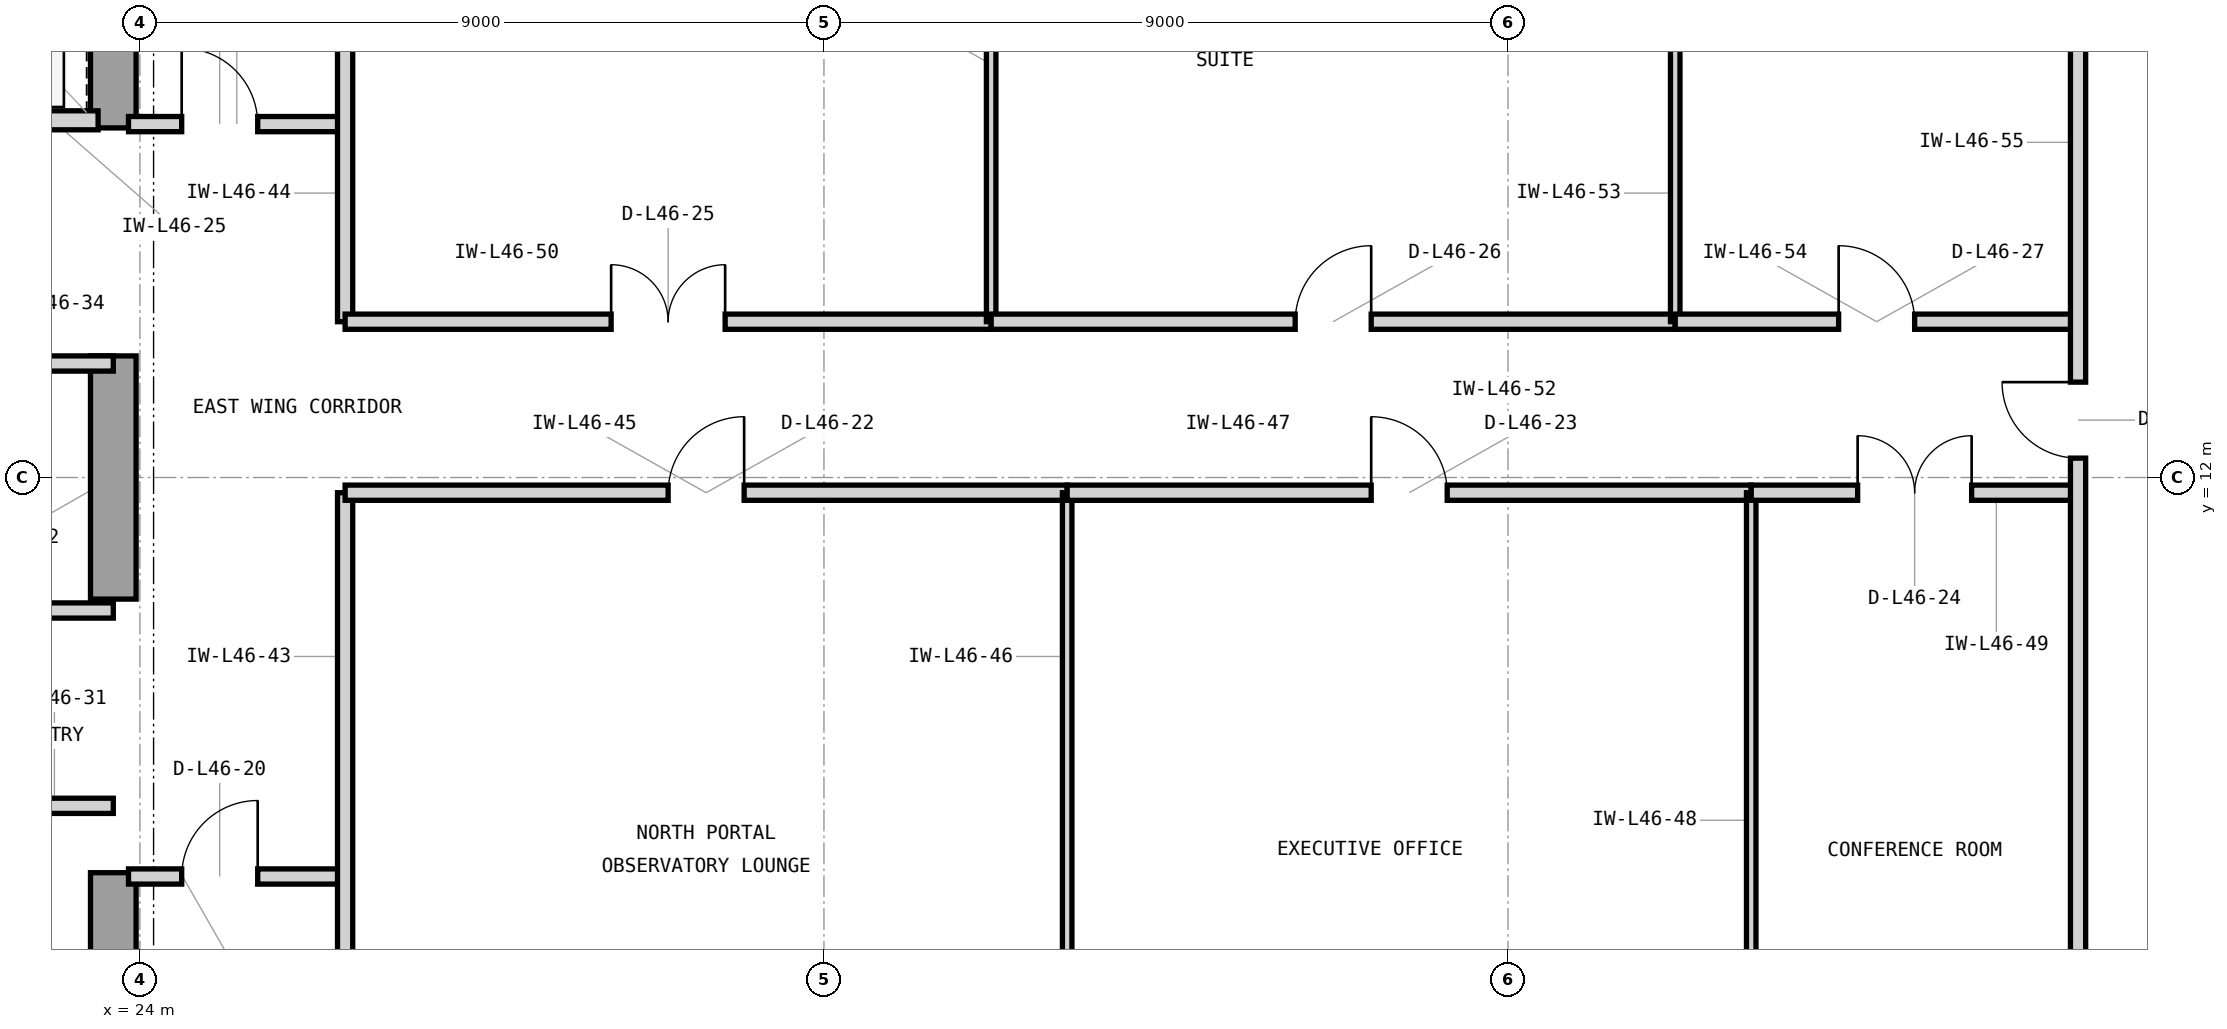
"""IFC4 building model, lengths in metres.
Left out: names, types, materials, properties, quantities, classifications, styles, units other than length and angle.
Written with IfcOpenShell. Run it as: python <this file> out.ifc"""

import sys

from ifc_helpers import new_model, si_unit, direction, frame, frame_2d, origin, place, context, subcontext, project, spatial, rectangle, extrude, element, fill, save


model = new_model("IFC4")
c1 = context("Model", 3, precision=1e-05, world=origin(), true_north=direction((0.0, 1.0)))
c2 = subcontext(c1, "Body", "Model", "MODEL_VIEW")
j1 = project(units=[si_unit("LENGTHUNIT", "METRE"), si_unit("PLANEANGLEUNIT", "RADIAN")], contexts=[c1])
p1 = place(None, origin())
s1 = spatial("IfcSite", under=j1, at=p1, CompositionType="ELEMENT")
p2 = place(p1, origin())
s2 = spatial("IfcBuilding", under=s1, at=p2, CompositionType="ELEMENT")
p3 = place(p2, frame((0.0, 0.0, 191.7)))
s3 = spatial("IfcBuildingStorey", under=s2, at=p3, CompositionType="ELEMENT", Elevation=191.7)
p4 = place(p3, frame((23.65, 3.65, 0.0), z_axis=(0.0, 0.0, 1.0), x_axis=(0.0, 1.0, 0.0)))
e1 = element("IfcWall", 1, at=p4, inside=s3, PredefinedType="SHEAR", context=c2, shape_type="SweptSolid", body=[
    extrude(rectangle(XDim=3.15, YDim=0.6, at=frame_2d((1.575, 0.0))), origin(), (0.0, 0.0, 1.0), 3.9),
])
p5 = place(p3, frame((23.65, 10.4, 0.0), z_axis=(0.0, 0.0, 1.0), x_axis=(0.0, 1.0, 0.0)))
e2 = element("IfcWall", 2, at=p5, inside=s3, PredefinedType="SHEAR", context=c2, shape_type="SweptSolid", body=[
    extrude(rectangle(XDim=3.2, YDim=0.6, at=frame_2d((1.6, 0.0))), origin(), (0.0, 0.0, 1.0), 3.9),
])
p6 = place(p3, frame((23.65, 16.6, 0.0), z_axis=(0.0, 0.0, 1.0), x_axis=(0.0, 1.0, 0.0)))
e3 = element("IfcWall", 3, at=p6, inside=s3, PredefinedType="SHEAR", context=c2, shape_type="SweptSolid", body=[
    extrude(rectangle(XDim=4.05, YDim=0.6, at=frame_2d((2.025, 0.0))), origin(), (0.0, 0.0, 1.0), 3.9),
])
p7 = place(p3, frame((21.05, 16.7, 0.0), z_axis=(0.0, 0.0, 1.0), x_axis=(1.0, 0.0, 0.0)))
e4 = element("IfcWall", 4, at=p7, inside=s3, PredefinedType="PARTITIONING", context=c2, shape_type="SweptSolid", body=[
    extrude(rectangle(XDim=2.4, YDim=0.25, at=frame_2d((1.2, 0.0))), origin(), (0.0, 0.0, 1.0), 3.283),
])
p8 = place(p7, frame((0.52, 0.0, 0.0)))
e5 = element("IfcOpeningElement", 5, at=p8, cuts=e4, PredefinedType="OPENING", context=c2, shape_type="SweptSolid", body=[
    extrude(rectangle(XDim=1.15, YDim=2.25, at=frame_2d((0.575, 1.125))), frame((0.0, 0.135, 0.0), z_axis=(0.0, -1.0, 0.0), x_axis=(1.0, 0.0, 0.0)), (0.0, 0.0, 1.0), 0.27),
])
p9 = place(p3, frame((20.55, 7.68, 0.0), z_axis=(0.0, 0.0, 1.0), x_axis=(1.0, 0.0, 0.0)))
e6 = element("IfcWall", 6, at=p9, inside=s3, PredefinedType="PARTITIONING", context=c2, shape_type="SweptSolid", body=[
    extrude(rectangle(XDim=3.1, YDim=0.2, at=frame_2d((1.55, 0.0))), origin(), (0.0, 0.0, 1.0), 3.69),
])
p10 = place(p9, frame((1.075, 0.0, 0.0)))
e7 = element("IfcOpeningElement", 7, at=p10, cuts=e6, PredefinedType="OPENING", context=c2, shape_type="SweptSolid", body=[
    extrude(rectangle(XDim=0.95, YDim=2.1, at=frame_2d((0.475, 1.05))), frame((0.0, 0.11, 0.0), z_axis=(0.0, -1.0, 0.0), x_axis=(1.0, 0.0, 0.0)), (0.0, 0.0, 1.0), 0.22),
])
p11 = place(p3, frame((14.825, 10.25, 0.0), z_axis=(0.0, 0.0, 1.0), x_axis=(1.0, 0.0, 0.0)))
e8 = element("IfcWall", 8, at=p11, inside=s3, PredefinedType="PARTITIONING", context=c2, shape_type="SweptSolid", body=[
    extrude(rectangle(XDim=8.825, YDim=0.2, at=frame_2d((4.413, 0.0))), origin(), (0.0, 0.0, 1.0), 3.69),
])
p12 = place(p3, frame((18.45, 13.5, 0.0), z_axis=(0.0, 0.0, 1.0), x_axis=(1.0, 0.0, 0.0)))
e9 = element("IfcWall", 9, at=p12, inside=s3, PredefinedType="PARTITIONING", context=c2, shape_type="SweptSolid", body=[
    extrude(rectangle(XDim=5.2, YDim=0.2, at=frame_2d((2.6, 0.0))), origin(), (0.0, 0.0, 1.0), 3.283),
])
p13 = place(p12, frame((2.125, 0.0, 0.0)))
e10 = element("IfcOpeningElement", 10, at=p13, cuts=e9, PredefinedType="OPENING", context=c2, shape_type="SweptSolid", body=[
    extrude(rectangle(XDim=0.95, YDim=2.1, at=frame_2d((0.475, 1.05))), frame((0.0, 0.11, 0.0), z_axis=(0.0, -1.0, 0.0), x_axis=(1.0, 0.0, 0.0)), (0.0, 0.0, 1.0), 0.22),
])
p14 = place(p3, frame((23.85, 6.75, 0.0), z_axis=(0.0, 0.0, 1.0), x_axis=(1.0, 0.0, 0.0)))
e11 = element("IfcWall", 11, at=p14, inside=s3, PredefinedType="PARTITIONING", context=c2, shape_type="SweptSolid", body=[
    extrude(rectangle(XDim=2.85, YDim=0.2, at=frame_2d((1.425, 0.0))), origin(), (0.0, 0.0, 1.0), 3.69),
])
p15 = place(p14, frame((0.7, 0.0, 0.0)))
e12 = element("IfcOpeningElement", 12, at=p15, cuts=e11, PredefinedType="OPENING", context=c2, shape_type="SweptSolid", body=[
    extrude(rectangle(XDim=1.0, YDim=2.15, at=frame_2d((0.5, 1.075))), frame((0.0, 0.11, 0.0), z_axis=(0.0, -1.0, 0.0), x_axis=(1.0, 0.0, 0.0)), (0.0, 0.0, 1.0), 0.22),
])
p16 = place(p3, frame((23.85, 16.65, 0.0), z_axis=(0.0, 0.0, 1.0), x_axis=(1.0, 0.0, 0.0)))
e13 = element("IfcWall", 13, at=p16, inside=s3, PredefinedType="PARTITIONING", context=c2, shape_type="SweptSolid", body=[
    extrude(rectangle(XDim=2.85, YDim=0.2, at=frame_2d((1.425, 0.0))), origin(), (0.0, 0.0, 1.0), 3.69),
])
p17 = place(p16, frame((0.7, 0.0, 0.0)))
e14 = element("IfcOpeningElement", 14, at=p17, cuts=e13, PredefinedType="OPENING", context=c2, shape_type="SweptSolid", body=[
    extrude(rectangle(XDim=1.0, YDim=2.15, at=frame_2d((0.5, 1.075))), frame((0.0, 0.11, 0.0), z_axis=(0.0, -1.0, 0.0), x_axis=(1.0, 0.0, 0.0)), (0.0, 0.0, 1.0), 0.22),
])
p18 = place(p3, frame((26.7, 3.18, 0.0), z_axis=(0.0, 0.0, 1.0), x_axis=(0.0, 1.0, 0.0)))
e15 = element("IfcWall", 15, at=p18, inside=s3, PredefinedType="PARTITIONING", context=c2, shape_type="SweptSolid", body=[
    extrude(rectangle(XDim=8.62, YDim=0.2, at=frame_2d((4.31, 0.0))), origin(), (0.0, 0.0, 1.0), 3.69),
])
p19 = place(p3, frame((26.7, 14.05, 0.0), z_axis=(0.0, 0.0, 1.0), x_axis=(0.0, 1.0, 0.0)))
e16 = element("IfcWall", 16, at=p19, inside=s3, PredefinedType="PARTITIONING", context=c2, shape_type="SweptSolid", body=[
    extrude(rectangle(XDim=6.77, YDim=0.2, at=frame_2d((3.385, 0.0))), origin(), (0.0, 0.0, 1.0), 3.69),
])
p20 = place(p3, frame((26.7, 11.8, 0.0), z_axis=(0.0, 0.0, 1.0), x_axis=(1.0, 0.0, 0.0)))
e17 = element("IfcWall", 17, at=p20, inside=s3, PredefinedType="PARTITIONING", context=c2, shape_type="SweptSolid", body=[
    extrude(rectangle(XDim=9.5, YDim=0.2, at=frame_2d((4.75, 0.0))), origin(), (0.0, 0.0, 1.0), 3.69),
])
p21 = place(p20, frame((4.25, 0.0, 0.0)))
e18 = element("IfcOpeningElement", 18, at=p21, cuts=e17, PredefinedType="OPENING", context=c2, shape_type="SweptSolid", body=[
    extrude(rectangle(XDim=1.0, YDim=2.15, at=frame_2d((0.5, 1.075))), frame((0.0, 0.11, 0.0), z_axis=(0.0, -1.0, 0.0), x_axis=(1.0, 0.0, 0.0)), (0.0, 0.0, 1.0), 0.22),
])
p22 = place(p3, frame((36.2, 3.18, 0.0), z_axis=(0.0, 0.0, 1.0), x_axis=(0.0, 1.0, 0.0)))
e19 = element("IfcWall", 19, at=p22, inside=s3, PredefinedType="PARTITIONING", context=c2, shape_type="SweptSolid", body=[
    extrude(rectangle(XDim=8.62, YDim=0.125, at=frame_2d((4.31, 0.0))), origin(), (0.0, 0.0, 1.0), 3.69),
])
p23 = place(p3, frame((36.2, 11.8, 0.0), z_axis=(0.0, 0.0, 1.0), x_axis=(1.0, 0.0, 0.0)))
e20 = element("IfcWall", 20, at=p23, inside=s3, PredefinedType="PARTITIONING", context=c2, shape_type="SweptSolid", body=[
    extrude(rectangle(XDim=9.0, YDim=0.2, at=frame_2d((4.5, 0.0))), origin(), (0.0, 0.0, 1.0), 3.69),
])
p24 = place(p23, frame((4.0, 0.0, 0.0)))
e21 = element("IfcOpeningElement", 21, at=p24, cuts=e20, PredefinedType="OPENING", context=c2, shape_type="SweptSolid", body=[
    extrude(rectangle(XDim=1.0, YDim=2.15, at=frame_2d((0.5, 1.075))), frame((0.0, 0.11, 0.0), z_axis=(0.0, -1.0, 0.0), x_axis=(1.0, 0.0, 0.0)), (0.0, 0.0, 1.0), 0.22),
])
p25 = place(p3, frame((45.2, 3.18, 0.0), z_axis=(0.0, 0.0, 1.0), x_axis=(0.0, 1.0, 0.0)))
e22 = element("IfcWall", 22, at=p25, inside=s3, PredefinedType="PARTITIONING", context=c2, shape_type="SweptSolid", body=[
    extrude(rectangle(XDim=8.62, YDim=0.125, at=frame_2d((4.31, 0.0))), origin(), (0.0, 0.0, 1.0), 3.69),
])
p26 = place(p3, frame((45.2, 11.8, 0.0), z_axis=(0.0, 0.0, 1.0), x_axis=(1.0, 0.0, 0.0)))
e23 = element("IfcWall", 23, at=p26, inside=s3, PredefinedType="PARTITIONING", context=c2, shape_type="SweptSolid", body=[
    extrude(rectangle(XDim=4.3, YDim=0.2, at=frame_2d((2.15, 0.0))), origin(), (0.0, 0.0, 1.0), 3.69),
])
p27 = place(p26, frame((1.4, 0.0, 0.0)))
e24 = element("IfcOpeningElement", 24, at=p27, cuts=e23, PredefinedType="OPENING", context=c2, shape_type="SweptSolid", body=[
    extrude(rectangle(XDim=1.5, YDim=2.3, at=frame_2d((0.75, 1.15))), frame((0.0, 0.11, 0.0), z_axis=(0.0, -1.0, 0.0), x_axis=(1.0, 0.0, 0.0)), (0.0, 0.0, 1.0), 0.22),
])
p28 = place(p3, frame((26.7, 14.05, 0.0), z_axis=(0.0, 0.0, 1.0), x_axis=(1.0, 0.0, 0.0)))
e25 = element("IfcWall", 25, at=p28, inside=s3, PredefinedType="PARTITIONING", context=c2, shape_type="SweptSolid", body=[
    extrude(rectangle(XDim=8.5, YDim=0.2, at=frame_2d((4.25, 0.0))), origin(), (0.0, 0.0, 1.0), 3.69),
])
p29 = place(p28, frame((3.5, 0.0, 0.0)))
e26 = element("IfcOpeningElement", 26, at=p29, cuts=e25, PredefinedType="OPENING", context=c2, shape_type="SweptSolid", body=[
    extrude(rectangle(XDim=1.5, YDim=2.3, at=frame_2d((0.75, 1.15))), frame((0.0, 0.11, 0.0), z_axis=(0.0, -1.0, 0.0), x_axis=(1.0, 0.0, 0.0)), (0.0, 0.0, 1.0), 0.22),
])
p30 = place(p3, frame((35.2, 14.05, 0.0), z_axis=(0.0, 0.0, 1.0), x_axis=(0.0, 1.0, 0.0)))
e27 = element("IfcWall", 27, at=p30, inside=s3, PredefinedType="PARTITIONING", context=c2, shape_type="SweptSolid", body=[
    extrude(rectangle(XDim=6.77, YDim=0.125, at=frame_2d((3.385, 0.0))), origin(), (0.0, 0.0, 1.0), 3.69),
])
p31 = place(p3, frame((35.2, 14.05, 0.0), z_axis=(0.0, 0.0, 1.0), x_axis=(1.0, 0.0, 0.0)))
e28 = element("IfcWall", 28, at=p31, inside=s3, PredefinedType="PARTITIONING", context=c2, shape_type="SweptSolid", body=[
    extrude(rectangle(XDim=9.0, YDim=0.2, at=frame_2d((4.5, 0.0))), origin(), (0.0, 0.0, 1.0), 3.69),
])
p32 = place(p31, frame((4.0, 0.0, 0.0)))
e29 = element("IfcOpeningElement", 29, at=p32, cuts=e28, PredefinedType="OPENING", context=c2, shape_type="SweptSolid", body=[
    extrude(rectangle(XDim=1.0, YDim=2.15, at=frame_2d((0.5, 1.075))), frame((0.0, 0.11, 0.0), z_axis=(0.0, -1.0, 0.0), x_axis=(1.0, 0.0, 0.0)), (0.0, 0.0, 1.0), 0.22),
])
p33 = place(p3, frame((44.2, 14.05, 0.0), z_axis=(0.0, 0.0, 1.0), x_axis=(0.0, 1.0, 0.0)))
e30 = element("IfcWall", 30, at=p33, inside=s3, PredefinedType="PARTITIONING", context=c2, shape_type="SweptSolid", body=[
    extrude(rectangle(XDim=6.77, YDim=0.125, at=frame_2d((3.385, 0.0))), origin(), (0.0, 0.0, 1.0), 3.69),
])
p34 = place(p3, frame((44.2, 14.05, 0.0), z_axis=(0.0, 0.0, 1.0), x_axis=(1.0, 0.0, 0.0)))
e31 = element("IfcWall", 31, at=p34, inside=s3, PredefinedType="PARTITIONING", context=c2, shape_type="SweptSolid", body=[
    extrude(rectangle(XDim=5.3, YDim=0.2, at=frame_2d((2.65, 0.0))), origin(), (0.0, 0.0, 1.0), 3.69),
])
p35 = place(p34, frame((2.15, 0.0, 0.0)))
e32 = element("IfcOpeningElement", 32, at=p35, cuts=e31, PredefinedType="OPENING", context=c2, shape_type="SweptSolid", body=[
    extrude(rectangle(XDim=1.0, YDim=2.15, at=frame_2d((0.5, 1.075))), frame((0.0, 0.11, 0.0), z_axis=(0.0, -1.0, 0.0), x_axis=(1.0, 0.0, 0.0)), (0.0, 0.0, 1.0), 0.22),
])
p36 = place(p3, frame((49.5, 3.18, 0.0), z_axis=(0.0, 0.0, 1.0), x_axis=(0.0, 1.0, 0.0)))
e33 = element("IfcWall", 33, at=p36, inside=s3, PredefinedType="PARTITIONING", context=c2, shape_type="SweptSolid", body=[
    extrude(rectangle(XDim=17.64, YDim=0.2, at=frame_2d((8.82, 0.0))), origin(), (0.0, 0.0, 1.0), 3.69),
])
p37 = place(p36, frame((9.075, 0.0, 0.0)))
e34 = element("IfcOpeningElement", 34, at=p37, cuts=e33, PredefinedType="OPENING", context=c2, shape_type="SweptSolid", body=[
    extrude(rectangle(XDim=1.0, YDim=2.15, at=frame_2d((0.5, 1.075))), frame((0.0, 0.11, 0.0), z_axis=(0.0, -1.0, 0.0), x_axis=(1.0, 0.0, 0.0)), (0.0, 0.0, 1.0), 0.22),
])
p38 = place(p15, origin())
e35 = element("IfcDoor", 35, at=p38, inside=s3, OperationType="SINGLE_SWING_RIGHT", PredefinedType="DOOR", context=c2, shape_type="SweptSolid", body=[
    extrude(rectangle(XDim=1.0, YDim=2.15, at=frame_2d((0.5, 1.075))), frame((0.0, 0.025, 0.0), z_axis=(0.0, -1.0, 0.0), x_axis=(1.0, 0.0, 0.0)), (0.0, 0.0, 1.0), 0.05),
])
fill(e12, e35)
p39 = place(p17, origin())
e36 = element("IfcDoor", 36, at=p39, inside=s3, OperationType="SINGLE_SWING_LEFT", PredefinedType="DOOR", context=c2, shape_type="SweptSolid", body=[
    extrude(rectangle(XDim=1.0, YDim=2.15, at=frame_2d((0.5, 1.075))), frame((0.0, 0.025, 0.0), z_axis=(0.0, -1.0, 0.0), x_axis=(1.0, 0.0, 0.0)), (0.0, 0.0, 1.0), 0.05),
])
fill(e14, e36)
p40 = place(p21, origin())
e37 = element("IfcDoor", 37, at=p40, inside=s3, OperationType="SINGLE_SWING_RIGHT", PredefinedType="DOOR", context=c2, shape_type="SweptSolid", body=[
    extrude(rectangle(XDim=1.0, YDim=2.15, at=frame_2d((0.5, 1.075))), frame((0.0, 0.025, 0.0), z_axis=(0.0, -1.0, 0.0), x_axis=(1.0, 0.0, 0.0)), (0.0, 0.0, 1.0), 0.05),
])
fill(e18, e37)
p41 = place(p24, origin())
e38 = element("IfcDoor", 38, at=p41, inside=s3, OperationType="SINGLE_SWING_LEFT", PredefinedType="DOOR", context=c2, shape_type="SweptSolid", body=[
    extrude(rectangle(XDim=1.0, YDim=2.15, at=frame_2d((0.5, 1.075))), frame((0.0, 0.025, 0.0), z_axis=(0.0, -1.0, 0.0), x_axis=(1.0, 0.0, 0.0)), (0.0, 0.0, 1.0), 0.05),
])
fill(e21, e38)
p42 = place(p27, origin())
e39 = element("IfcDoor", 39, at=p42, inside=s3, OperationType="DOUBLE_DOOR_SINGLE_SWING", PredefinedType="DOOR", context=c2, shape_type="SweptSolid", body=[
    extrude(rectangle(XDim=1.5, YDim=2.3, at=frame_2d((0.75, 1.15))), frame((0.0, 0.025, 0.0), z_axis=(0.0, -1.0, 0.0), x_axis=(1.0, 0.0, 0.0)), (0.0, 0.0, 1.0), 0.05),
])
fill(e24, e39)
p43 = place(p29, origin())
e40 = element("IfcDoor", 40, at=p43, inside=s3, OperationType="DOUBLE_DOOR_SINGLE_SWING", PredefinedType="DOOR", context=c2, shape_type="SweptSolid", body=[
    extrude(rectangle(XDim=1.5, YDim=2.3, at=frame_2d((0.75, 1.15))), frame((0.0, 0.025, 0.0), z_axis=(0.0, -1.0, 0.0), x_axis=(1.0, 0.0, 0.0)), (0.0, 0.0, 1.0), 0.05),
])
fill(e26, e40)
p44 = place(p32, origin())
e41 = element("IfcDoor", 41, at=p44, inside=s3, OperationType="SINGLE_SWING_RIGHT", PredefinedType="DOOR", context=c2, shape_type="SweptSolid", body=[
    extrude(rectangle(XDim=1.0, YDim=2.15, at=frame_2d((0.5, 1.075))), frame((0.0, 0.025, 0.0), z_axis=(0.0, -1.0, 0.0), x_axis=(1.0, 0.0, 0.0)), (0.0, 0.0, 1.0), 0.05),
])
fill(e29, e41)
p45 = place(p35, origin())
e42 = element("IfcDoor", 42, at=p45, inside=s3, OperationType="SINGLE_SWING_LEFT", PredefinedType="DOOR", context=c2, shape_type="SweptSolid", body=[
    extrude(rectangle(XDim=1.0, YDim=2.15, at=frame_2d((0.5, 1.075))), frame((0.0, 0.025, 0.0), z_axis=(0.0, -1.0, 0.0), x_axis=(1.0, 0.0, 0.0)), (0.0, 0.0, 1.0), 0.05),
])
fill(e32, e42)
p46 = place(p37, origin())
e43 = element("IfcDoor", 43, at=p46, inside=s3, OperationType="SINGLE_SWING_RIGHT", PredefinedType="DOOR", context=c2, shape_type="SweptSolid", body=[
    extrude(rectangle(XDim=1.0, YDim=2.15, at=frame_2d((0.5, 1.075))), frame((0.0, 0.025, 0.0), z_axis=(0.0, -1.0, 0.0), x_axis=(1.0, 0.0, 0.0)), (0.0, 0.0, 1.0), 0.05),
])
fill(e34, e43)
save(model, sys.argv[1])
